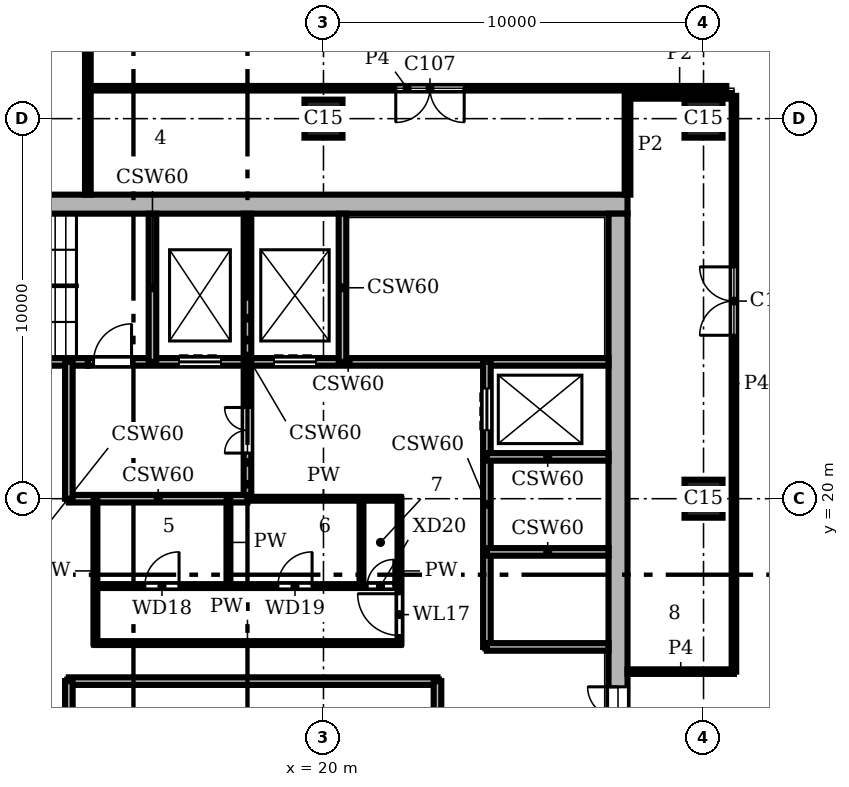
"""IFC4 building model, lengths in metres.
Left out: names, types, materials, properties, quantities, classifications, styles, units other than length and angle.
Written with IfcOpenShell. Run it as: python <this file> out.ifc"""

import sys

from ifc_helpers import new_model, si_unit, direction, frame, frame_2d, origin, origin_2d, place, context, subcontext, project, spatial, rectangle, extrude, element, fill, save


model = new_model("IFC4")
c1 = context("Model", 3, precision=1e-05, world=origin(), true_north=direction((0.0, 1.0)))
c2 = subcontext(c1, "Body", "Model", "MODEL_VIEW")
j1 = project(units=[si_unit("LENGTHUNIT", "METRE"), si_unit("PLANEANGLEUNIT", "RADIAN")], contexts=[c1])
p1 = place(None, origin())
s1 = spatial("IfcSite", under=j1, at=p1, CompositionType="ELEMENT")
p2 = place(p1, origin())
s2 = spatial("IfcBuilding", under=s1, at=p2, CompositionType="ELEMENT")
p3 = place(p2, frame((0.0, 0.0, 251.4)))
s3 = spatial("IfcBuildingStorey", under=s2, at=p3, CompositionType="ELEMENT", Elevation=251.4)
for number, where, z_axis, x_axis in (
    (1, (20.0, 30.0, 0.0), (0.0, 0.0, 1.0), (1.0, 0.0, 0.0)),
    (2, (30.0, 20.0, 0.0), (0.0, 0.0, 1.0), (1.0, 0.0, 0.0)),
    (3, (30.0, 30.0, 0.0), (0.0, 0.0, 1.0), (1.0, 0.0, 0.0)),
):
    element("IfcColumn", number, at=place(p3, frame(where, z_axis=z_axis, x_axis=x_axis)), inside=s3, PredefinedType="COLUMN", context=c2, shape_type="SweptSolid", body=[
        extrude(rectangle(XDim=1.0, YDim=1.0, at=origin_2d()), origin(), (0.0, 0.0, 1.0), 3.9),
    ])
p4 = place(p3, frame((27.75, 8.5, 0.0), z_axis=(0.0, 0.0, 1.0), x_axis=(0.0, 1.0, 0.0)))
e4 = element("IfcWall", 4, at=p4, inside=s3, PredefinedType="SHEAR", context=c2, shape_type="SweptSolid", body=[
    extrude(rectangle(XDim=19.0, YDim=0.5, at=frame_2d((9.5, 0.0))), origin(), (0.0, 0.0, 1.0), 3.9),
])
p5 = place(p4, frame((4.95, 0.0, 0.0)))
e5 = element("IfcOpeningElement", 5, at=p5, cuts=e4, PredefinedType="OPENING", context=c2, shape_type="SweptSolid", body=[
    extrude(rectangle(XDim=1.6, YDim=2.1, at=frame_2d((0.8, 1.05))), frame((0.0, 0.26, 0.0), z_axis=(0.0, -1.0, 0.0), x_axis=(1.0, 0.0, 0.0)), (0.0, 0.0, 1.0), 0.52),
])
p6 = place(p3, frame((28.0, 27.75, 0.0), z_axis=(0.0, 0.0, 1.0), x_axis=(-1.0, 0.0, 0.0)))
e6 = element("IfcWall", 6, at=p6, inside=s3, PredefinedType="SHEAR", context=c2, shape_type="SweptSolid", body=[
    extrude(rectangle(XDim=20.0, YDim=0.5, at=frame_2d((10.0, 0.0))), origin(), (0.0, 0.0, 1.0), 3.9),
])
p7 = place(p3, frame((13.3, 15.2, 0.0), z_axis=(0.0, 0.0, 1.0), x_axis=(1.0, 0.0, 0.0)))
e7 = element("IfcWall", 7, at=p7, inside=s3, PredefinedType="SHEAR", context=c2, shape_type="SweptSolid", body=[
    extrude(rectangle(XDim=9.7, YDim=0.2, at=frame_2d((4.85, 0.0))), origin(), (0.0, 0.0, 1.0), 3.58),
])
p8 = place(p3, frame((24.3, 16.1, 0.0), z_axis=(0.0, 0.0, 1.0), x_axis=(1.0, 0.0, 0.0)))
e8 = element("IfcWall", 8, at=p8, inside=s3, PredefinedType="SHEAR", context=c2, shape_type="SweptSolid", body=[
    extrude(rectangle(XDim=3.2, YDim=0.2, at=frame_2d((1.6, 0.0))), origin(), (0.0, 0.0, 1.0), 3.58),
])
p9 = place(p3, frame((14.0, 16.2, 0.0), z_axis=(0.0, 0.0, 1.0), x_axis=(1.0, 0.0, 0.0)))
e9 = element("IfcWall", 9, at=p9, inside=s3, PredefinedType="PARTITIONING", context=c2, shape_type="SweptSolid", body=[
    extrude(rectangle(XDim=8.0, YDim=0.1, at=frame_2d((4.0, 0.0))), origin(), (0.0, 0.0, 1.0), 3.58),
])
p10 = place(p3, frame((14.0, 17.7, 0.0), z_axis=(0.0, 0.0, 1.0), x_axis=(1.0, 0.0, 0.0)))
e10 = element("IfcWall", 10, at=p10, inside=s3, PredefinedType="PARTITIONING", context=c2, shape_type="SweptSolid", body=[
    extrude(rectangle(XDim=8.0, YDim=0.1, at=frame_2d((4.0, 0.0))), origin(), (0.0, 0.0, 1.0), 3.58),
])
p11 = place(p10, frame((1.3, 0.0, 0.0)))
e11 = element("IfcOpeningElement", 11, at=p11, cuts=e10, PredefinedType="OPENING", context=c2, shape_type="SweptSolid", body=[
    extrude(rectangle(XDim=0.9, YDim=2.1, at=frame_2d((0.45, 1.05))), frame((0.0, 0.06, 0.0), z_axis=(0.0, -1.0, 0.0), x_axis=(1.0, 0.0, 0.0)), (0.0, 0.0, 1.0), 0.12),
])
p12 = place(p10, frame((4.8, 0.0, 0.0)))
e12 = element("IfcOpeningElement", 12, at=p12, cuts=e10, PredefinedType="OPENING", context=c2, shape_type="SweptSolid", body=[
    extrude(rectangle(XDim=0.9, YDim=2.1, at=frame_2d((0.45, 1.05))), frame((0.0, 0.06, 0.0), z_axis=(0.0, -1.0, 0.0), x_axis=(1.0, 0.0, 0.0)), (0.0, 0.0, 1.0), 0.12),
])
p13 = place(p10, frame((7.15, 0.0, 0.0)))
e13 = element("IfcOpeningElement", 13, at=p13, cuts=e10, PredefinedType="OPENING", context=c2, shape_type="SweptSolid", body=[
    extrude(rectangle(XDim=0.7, YDim=2.1, at=frame_2d((0.35, 1.05))), frame((0.0, 0.06, 0.0), z_axis=(0.0, -1.0, 0.0), x_axis=(1.0, 0.0, 0.0)), (0.0, 0.0, 1.0), 0.12),
])
p14 = place(p3, frame((24.3, 18.6, 0.0), z_axis=(0.0, 0.0, 1.0), x_axis=(1.0, 0.0, 0.0)))
e14 = element("IfcWall", 14, at=p14, inside=s3, PredefinedType="SHEAR", context=c2, shape_type="SweptSolid", body=[
    extrude(rectangle(XDim=3.2, YDim=0.2, at=frame_2d((1.6, 0.0))), origin(), (0.0, 0.0, 1.0), 3.58),
])
p15 = place(p3, frame((18.0, 20.0, 0.0), z_axis=(0.0, 0.0, 1.0), x_axis=(1.0, 0.0, 0.0)))
e15 = element("IfcWall", 15, at=p15, inside=s3, PredefinedType="PARTITIONING", context=c2, shape_type="SweptSolid", body=[
    extrude(rectangle(XDim=4.0, YDim=0.1, at=frame_2d((2.0, 0.0))), origin(), (0.0, 0.0, 1.0), 3.58),
])
p16 = place(p3, frame((13.3, 20.0, 0.0), z_axis=(0.0, 0.0, 1.0), x_axis=(1.0, 0.0, 0.0)))
e16 = element("IfcWall", 16, at=p16, inside=s3, PredefinedType="SHEAR", context=c2, shape_type="SweptSolid", body=[
    extrude(rectangle(XDim=4.7, YDim=0.2, at=frame_2d((2.35, 0.0))), origin(), (0.0, 0.0, 1.0), 3.58),
])
p17 = place(p3, frame((24.3, 21.1, 0.0), z_axis=(0.0, 0.0, 1.0), x_axis=(1.0, 0.0, 0.0)))
e17 = element("IfcWall", 17, at=p17, inside=s3, PredefinedType="SHEAR", context=c2, shape_type="SweptSolid", body=[
    extrude(rectangle(XDim=3.2, YDim=0.2, at=frame_2d((1.6, 0.0))), origin(), (0.0, 0.0, 1.0), 3.58),
])
p18 = place(p3, frame((8.5, 23.6, 0.0), z_axis=(0.0, 0.0, 1.0), x_axis=(1.0, 0.0, 0.0)))
e18 = element("IfcWall", 18, at=p18, inside=s3, PredefinedType="SHEAR", context=c2, shape_type="SweptSolid", body=[
    extrude(rectangle(XDim=5.3, YDim=0.2, at=frame_2d((2.65, 0.0))), origin(), (0.0, 0.0, 1.0), 3.58),
])
p19 = place(p3, frame((13.8, 23.6, 0.0), z_axis=(0.0, 0.0, 1.0), x_axis=(1.0, 0.0, 0.0)))
e19 = element("IfcWall", 19, at=p19, inside=s3, PredefinedType="SHEAR", context=c2, shape_type="SweptSolid", body=[
    extrude(rectangle(XDim=13.7, YDim=0.2, at=frame_2d((6.85, 0.0))), origin(), (0.0, 0.0, 1.0), 3.58),
])
p20 = place(p19, frame((2.4, 0.0, 0.0)))
e20 = element("IfcOpeningElement", 20, at=p20, cuts=e19, PredefinedType="OPENING", context=c2, shape_type="SweptSolid", body=[
    extrude(rectangle(XDim=1.1, YDim=2.1, at=frame_2d((0.55, 1.05))), frame((0.0, 0.11, 0.0), z_axis=(0.0, -1.0, 0.0), x_axis=(1.0, 0.0, 0.0)), (0.0, 0.0, 1.0), 0.22),
])
p21 = place(p19, frame((4.9, 0.0, 0.0)))
e21 = element("IfcOpeningElement", 21, at=p21, cuts=e19, PredefinedType="OPENING", context=c2, shape_type="SweptSolid", body=[
    extrude(rectangle(XDim=1.1, YDim=2.1, at=frame_2d((0.55, 1.05))), frame((0.0, 0.11, 0.0), z_axis=(0.0, -1.0, 0.0), x_axis=(1.0, 0.0, 0.0)), (0.0, 0.0, 1.0), 0.22),
])
p22 = place(p19, frame((0.15, 0.0, 0.0)))
e22 = element("IfcOpeningElement", 22, at=p22, cuts=e19, PredefinedType="OPENING", context=c2, shape_type="SweptSolid", body=[
    extrude(rectangle(XDim=1.0, YDim=2.1, at=frame_2d((0.5, 1.05))), frame((0.0, 0.11, 0.0), z_axis=(0.0, -1.0, 0.0), x_axis=(1.0, 0.0, 0.0)), (0.0, 0.0, 1.0), 0.22),
])
p23 = place(p3, frame((13.3, 12.4, 0.0), z_axis=(0.0, 0.0, 1.0), x_axis=(0.0, 1.0, 0.0)))
e23 = element("IfcWall", 23, at=p23, inside=s3, PredefinedType="SHEAR", context=c2, shape_type="SweptSolid", body=[
    extrude(rectangle(XDim=2.8, YDim=0.2, at=frame_2d((1.4, 0.0))), origin(), (0.0, 0.0, 1.0), 3.58),
])
p24 = place(p3, frame((13.3, 20.0, 0.0), z_axis=(0.0, 0.0, 1.0), x_axis=(0.0, 1.0, 0.0)))
e24 = element("IfcWall", 24, at=p24, inside=s3, PredefinedType="SHEAR", context=c2, shape_type="SweptSolid", body=[
    extrude(rectangle(XDim=3.6, YDim=0.2, at=frame_2d((1.8, 0.0))), origin(), (0.0, 0.0, 1.0), 3.58),
])
p25 = place(p3, frame((14.0, 16.2, 0.0), z_axis=(0.0, 0.0, 1.0), x_axis=(0.0, 1.0, 0.0)))
e25 = element("IfcWall", 25, at=p25, inside=s3, PredefinedType="PARTITIONING", context=c2, shape_type="SweptSolid", body=[
    extrude(rectangle(XDim=3.8, YDim=0.1, at=frame_2d((1.9, 0.0))), origin(), (0.0, 0.0, 1.0), 3.58),
])
p26 = place(p3, frame((15.5, 23.6, 0.0), z_axis=(0.0, 0.0, 1.0), x_axis=(0.0, 1.0, 0.0)))
e26 = element("IfcWall", 26, at=p26, inside=s3, PredefinedType="SHEAR", context=c2, shape_type="SweptSolid", body=[
    extrude(rectangle(XDim=3.9, YDim=0.2, at=frame_2d((1.95, 0.0))), origin(), (0.0, 0.0, 1.0), 3.58),
])
p27 = place(p3, frame((17.5, 17.7, 0.0), z_axis=(0.0, 0.0, 1.0), x_axis=(0.0, 1.0, 0.0)))
e27 = element("IfcWall", 27, at=p27, inside=s3, PredefinedType="PARTITIONING", context=c2, shape_type="SweptSolid", body=[
    extrude(rectangle(XDim=2.3, YDim=0.1, at=frame_2d((1.15, 0.0))), origin(), (0.0, 0.0, 1.0), 3.58),
])
p28 = place(p3, frame((18.0, 20.0, 0.0), z_axis=(0.0, 0.0, 1.0), x_axis=(0.0, 1.0, 0.0)))
e28 = element("IfcWall", 28, at=p28, inside=s3, PredefinedType="SHEAR", context=c2, shape_type="SweptSolid", body=[
    extrude(rectangle(XDim=7.5, YDim=0.2, at=frame_2d((3.75, 0.0))), origin(), (0.0, 0.0, 1.0), 3.58),
])
p29 = place(p28, frame((1.2, 0.0, 0.0)))
e29 = element("IfcOpeningElement", 29, at=p29, cuts=e28, PredefinedType="OPENING", context=c2, shape_type="SweptSolid", body=[
    extrude(rectangle(XDim=1.2, YDim=2.1, at=frame_2d((0.6, 1.05))), frame((0.0, 0.11, 0.0), z_axis=(0.0, -1.0, 0.0), x_axis=(1.0, 0.0, 0.0)), (0.0, 0.0, 1.0), 0.22),
])
p30 = place(p3, frame((20.5, 23.6, 0.0), z_axis=(0.0, 0.0, 1.0), x_axis=(0.0, 1.0, 0.0)))
e30 = element("IfcWall", 30, at=p30, inside=s3, PredefinedType="SHEAR", context=c2, shape_type="SweptSolid", body=[
    extrude(rectangle(XDim=3.9, YDim=0.2, at=frame_2d((1.95, 0.0))), origin(), (0.0, 0.0, 1.0), 3.58),
])
p31 = place(p3, frame((21.0, 17.7, 0.0), z_axis=(0.0, 0.0, 1.0), x_axis=(0.0, 1.0, 0.0)))
e31 = element("IfcWall", 31, at=p31, inside=s3, PredefinedType="PARTITIONING", context=c2, shape_type="SweptSolid", body=[
    extrude(rectangle(XDim=2.3, YDim=0.1, at=frame_2d((1.15, 0.0))), origin(), (0.0, 0.0, 1.0), 3.58),
])
p32 = place(p3, frame((22.0, 16.2, 0.0), z_axis=(0.0, 0.0, 1.0), x_axis=(0.0, 1.0, 0.0)))
e32 = element("IfcWall", 32, at=p32, inside=s3, PredefinedType="PARTITIONING", context=c2, shape_type="SweptSolid", body=[
    extrude(rectangle(XDim=3.8, YDim=0.1, at=frame_2d((1.9, 0.0))), origin(), (0.0, 0.0, 1.0), 3.58),
])
p33 = place(p32, frame((0.2, 0.0, 0.0)))
e33 = element("IfcOpeningElement", 33, at=p33, cuts=e32, PredefinedType="OPENING", context=c2, shape_type="SweptSolid", body=[
    extrude(rectangle(XDim=1.1, YDim=2.1, at=frame_2d((0.55, 1.05))), frame((0.0, 0.06, 0.0), z_axis=(0.0, -1.0, 0.0), x_axis=(1.0, 0.0, 0.0)), (0.0, 0.0, 1.0), 0.12),
])
p34 = place(p3, frame((23.0, 12.4, 0.0), z_axis=(0.0, 0.0, 1.0), x_axis=(0.0, 1.0, 0.0)))
e34 = element("IfcWall", 34, at=p34, inside=s3, PredefinedType="SHEAR", context=c2, shape_type="SweptSolid", body=[
    extrude(rectangle(XDim=2.8, YDim=0.2, at=frame_2d((1.4, 0.0))), origin(), (0.0, 0.0, 1.0), 3.58),
])
p35 = place(p34, frame((0.8, 0.0, 0.0)))
e35 = element("IfcOpeningElement", 35, at=p35, cuts=e34, PredefinedType="OPENING", context=c2, shape_type="SweptSolid", body=[
    extrude(rectangle(XDim=1.2, YDim=2.1, at=frame_2d((0.6, 1.05))), frame((0.0, 0.11, 0.0), z_axis=(0.0, -1.0, 0.0), x_axis=(1.0, 0.0, 0.0)), (0.0, 0.0, 1.0), 0.22),
])
p36 = place(p3, frame((24.3, 16.1, 0.0), z_axis=(0.0, 0.0, 1.0), x_axis=(0.0, 1.0, 0.0)))
e36 = element("IfcWall", 36, at=p36, inside=s3, PredefinedType="SHEAR", context=c2, shape_type="SweptSolid", body=[
    extrude(rectangle(XDim=7.5, YDim=0.2, at=frame_2d((3.75, 0.0))), origin(), (0.0, 0.0, 1.0), 3.58),
])
p37 = place(p36, frame((5.7, 0.0, 0.0)))
e37 = element("IfcOpeningElement", 37, at=p37, cuts=e36, PredefinedType="OPENING", context=c2, shape_type="SweptSolid", body=[
    extrude(rectangle(XDim=1.1, YDim=2.1, at=frame_2d((0.55, 1.05))), frame((0.0, 0.11, 0.0), z_axis=(0.0, -1.0, 0.0), x_axis=(1.0, 0.0, 0.0)), (0.0, 0.0, 1.0), 0.22),
])
p38 = place(p3, frame((13.8, 28.0, 0.0), z_axis=(0.0, 0.0, 1.0), x_axis=(0.0, 1.0, 0.0)))
e38 = element("IfcWall", 38, at=p38, inside=s3, PredefinedType="PARTITIONING", context=c2, shape_type="SweptSolid", body=[
    extrude(rectangle(XDim=29.6, YDim=0.15, at=frame_2d((14.8, 0.0))), origin(), (0.0, 0.0, 1.0), 3.58),
])
p39 = place(p38, frame((17.601, 0.0, 0.0)))
e39 = element("IfcOpeningElement", 39, at=p39, cuts=e38, PredefinedType="OPENING", context=c2, shape_type="SweptSolid", body=[
    extrude(rectangle(XDim=1.0, YDim=2.1, at=frame_2d((0.5, 1.05))), frame((0.0, 0.085, 0.0), z_axis=(0.0, -1.0, 0.0), x_axis=(1.0, 0.0, 0.0)), (0.0, 0.0, 1.0), 0.17),
])
p40 = place(p3, frame((28.0, 28.0, 0.0), z_axis=(0.0, 0.0, 1.0), x_axis=(0.0, 1.0, 0.0)))
e40 = element("IfcWall", 40, at=p40, inside=s3, PredefinedType="PARTITIONING", context=c2, shape_type="SweptSolid", body=[
    extrude(rectangle(XDim=2.598, YDim=0.15, at=frame_2d((1.299, 0.0))), origin(), (0.0, 0.0, 1.0), 3.58),
])
p41 = place(p3, frame((28.002, 30.6, 0.0), z_axis=(0.0, 0.0, 1.0), x_axis=(1.0, 0.0, 0.0)))
e41 = element("IfcWall", 41, at=p41, inside=s3, PredefinedType="PARTITIONING", context=c2, shape_type="SweptSolid", body=[
    extrude(rectangle(XDim=2.738, YDim=0.15, at=frame_2d((1.369, 0.0))), origin(), (0.0, 0.0, 1.0), 3.58),
])
p42 = place(p3, frame((30.8, 15.45, 0.0), z_axis=(0.0, 0.0, 1.0), x_axis=(0.0, 1.0, 0.0)))
e42 = element("IfcWall", 42, at=p42, inside=s3, PredefinedType="PARTITIONING", context=c2, shape_type="SweptSolid", body=[
    extrude(rectangle(XDim=15.15, YDim=0.12, at=frame_2d((7.575, 0.0))), origin(), (0.0, 0.0, 1.0), 3.58),
])
p43 = place(p42, frame((8.85, 0.0, 0.0)))
e43 = element("IfcOpeningElement", 43, at=p43, cuts=e42, PredefinedType="OPENING", context=c2, shape_type="SweptSolid", body=[
    extrude(rectangle(XDim=1.8, YDim=2.1, at=frame_2d((0.9, 1.05))), frame((0.0, 0.07, 0.0), z_axis=(0.0, -1.0, 0.0), x_axis=(1.0, 0.0, 0.0)), (0.0, 0.0, 1.0), 0.14),
])
p44 = place(p3, frame((28.0, 15.45, 0.0), z_axis=(0.0, 0.0, 1.0), x_axis=(1.0, 0.0, 0.0)))
e44 = element("IfcWall", 44, at=p44, inside=s3, PredefinedType="PARTITIONING", context=c2, shape_type="SweptSolid", body=[
    extrude(rectangle(XDim=2.8, YDim=0.12, at=frame_2d((1.4, 0.0))), origin(), (0.0, 0.0, 1.0), 3.58),
])
p45 = place(p3, frame((13.802, 30.8, 0.0), z_axis=(0.0, 0.0, 1.0), x_axis=(1.0, 0.0, 0.0)))
e45 = element("IfcWall", 45, at=p45, inside=s3, PredefinedType="PARTITIONING", context=c2, shape_type="SweptSolid", body=[
    extrude(rectangle(XDim=16.798, YDim=0.12, at=frame_2d((8.399, 0.0))), origin(), (0.0, 0.0, 1.0), 3.58),
])
p46 = place(p45, frame((8.1, 0.0, 0.0)))
e46 = element("IfcOpeningElement", 46, at=p46, cuts=e45, PredefinedType="OPENING", context=c2, shape_type="SweptSolid", body=[
    extrude(rectangle(XDim=1.8, YDim=2.1, at=frame_2d((0.9, 1.05))), frame((0.0, 0.07, 0.0), z_axis=(0.0, -1.0, 0.0), x_axis=(1.0, 0.0, 0.0)), (0.0, 0.0, 1.0), 0.14),
])
p47 = place(p37, origin())
e47 = element("IfcDoor", 47, at=p47, inside=s3, OperationType="DOUBLE_DOOR_SLIDING", PredefinedType="DOOR", context=c2, shape_type="SweptSolid", body=[
    extrude(rectangle(XDim=1.1, YDim=2.1, at=frame_2d((0.55, 1.05))), frame((0.0, 0.025, 0.0), z_axis=(0.0, -1.0, 0.0), x_axis=(1.0, 0.0, 0.0)), (0.0, 0.0, 1.0), 0.05),
])
fill(e37, e47)
p48 = place(p20, origin())
e48 = element("IfcDoor", 48, at=p48, inside=s3, OperationType="DOUBLE_DOOR_SLIDING", PredefinedType="DOOR", context=c2, shape_type="SweptSolid", body=[
    extrude(rectangle(XDim=1.1, YDim=2.1, at=frame_2d((0.55, 1.05))), frame((0.0, 0.025, 0.0), z_axis=(0.0, -1.0, 0.0), x_axis=(1.0, 0.0, 0.0)), (0.0, 0.0, 1.0), 0.05),
])
fill(e20, e48)
p49 = place(p21, origin())
e49 = element("IfcDoor", 49, at=p49, inside=s3, OperationType="DOUBLE_DOOR_SLIDING", PredefinedType="DOOR", context=c2, shape_type="SweptSolid", body=[
    extrude(rectangle(XDim=1.1, YDim=2.1, at=frame_2d((0.55, 1.05))), frame((0.0, 0.025, 0.0), z_axis=(0.0, -1.0, 0.0), x_axis=(1.0, 0.0, 0.0)), (0.0, 0.0, 1.0), 0.05),
])
fill(e21, e49)
p50 = place(p22, origin())
e50 = element("IfcDoor", 50, at=p50, inside=s3, OperationType="SINGLE_SWING_RIGHT", PredefinedType="DOOR", context=c2, shape_type="SweptSolid", body=[
    extrude(rectangle(XDim=1.0, YDim=2.1, at=frame_2d((0.5, 1.05))), frame((0.0, 0.025, 0.0), z_axis=(0.0, -1.0, 0.0), x_axis=(1.0, 0.0, 0.0)), (0.0, 0.0, 1.0), 0.05),
])
fill(e22, e50)
p51 = place(p29, origin())
e51 = element("IfcDoor", 51, at=p51, inside=s3, OperationType="DOUBLE_DOOR_SINGLE_SWING", PredefinedType="DOOR", context=c2, shape_type="SweptSolid", body=[
    extrude(rectangle(XDim=1.2, YDim=2.1, at=frame_2d((0.6, 1.05))), frame((0.0, 0.025, 0.0), z_axis=(0.0, -1.0, 0.0), x_axis=(1.0, 0.0, 0.0)), (0.0, 0.0, 1.0), 0.05),
])
fill(e29, e51)
p52 = place(p33, origin())
e52 = element("IfcDoor", 52, at=p52, inside=s3, OperationType="SINGLE_SWING_RIGHT", PredefinedType="DOOR", context=c2, shape_type="SweptSolid", body=[
    extrude(rectangle(XDim=1.1, YDim=2.1, at=frame_2d((0.55, 1.05))), frame((0.0, 0.025, 0.0), z_axis=(0.0, -1.0, 0.0), x_axis=(1.0, 0.0, 0.0)), (0.0, 0.0, 1.0), 0.05),
])
fill(e33, e52)
p53 = place(p11, origin())
e53 = element("IfcDoor", 53, at=p53, inside=s3, OperationType="SINGLE_SWING_RIGHT", PredefinedType="DOOR", context=c2, shape_type="SweptSolid", body=[
    extrude(rectangle(XDim=0.9, YDim=2.1, at=frame_2d((0.45, 1.05))), frame((0.0, 0.025, 0.0), z_axis=(0.0, -1.0, 0.0), x_axis=(1.0, 0.0, 0.0)), (0.0, 0.0, 1.0), 0.05),
])
fill(e11, e53)
p54 = place(p12, origin())
e54 = element("IfcDoor", 54, at=p54, inside=s3, OperationType="SINGLE_SWING_RIGHT", PredefinedType="DOOR", context=c2, shape_type="SweptSolid", body=[
    extrude(rectangle(XDim=0.9, YDim=2.1, at=frame_2d((0.45, 1.05))), frame((0.0, 0.025, 0.0), z_axis=(0.0, -1.0, 0.0), x_axis=(1.0, 0.0, 0.0)), (0.0, 0.0, 1.0), 0.05),
])
fill(e12, e54)
p55 = place(p13, origin())
e55 = element("IfcDoor", 55, at=p55, inside=s3, OperationType="SINGLE_SWING_RIGHT", PredefinedType="DOOR", context=c2, shape_type="SweptSolid", body=[
    extrude(rectangle(XDim=0.7, YDim=2.1, at=frame_2d((0.35, 1.05))), frame((0.0, 0.025, 0.0), z_axis=(0.0, -1.0, 0.0), x_axis=(1.0, 0.0, 0.0)), (0.0, 0.0, 1.0), 0.05),
])
fill(e13, e55)
p56 = place(p5, origin())
e56 = element("IfcDoor", 56, at=p56, inside=s3, OperationType="DOUBLE_DOOR_SINGLE_SWING", PredefinedType="DOOR", context=c2, shape_type="SweptSolid", body=[
    extrude(rectangle(XDim=1.6, YDim=2.1, at=frame_2d((0.8, 1.05))), frame((0.0, 0.025, 0.0), z_axis=(0.0, -1.0, 0.0), x_axis=(1.0, 0.0, 0.0)), (0.0, 0.0, 1.0), 0.05),
])
fill(e5, e56)
p57 = place(p46, frame((1.8, 0.0, 0.0), z_axis=(0.0, 0.0, 1.0), x_axis=(-1.0, 0.0, 0.0)))
e57 = element("IfcDoor", 57, at=p57, inside=s3, OperationType="DOUBLE_DOOR_SINGLE_SWING", PredefinedType="DOOR", context=c2, shape_type="SweptSolid", body=[
    extrude(rectangle(XDim=1.8, YDim=2.1, at=frame_2d((0.9, 1.05))), frame((0.0, 0.025, 0.0), z_axis=(0.0, -1.0, 0.0), x_axis=(1.0, 0.0, 0.0)), (0.0, 0.0, 1.0), 0.05),
])
fill(e46, e57)
p58 = place(p43, origin())
e58 = element("IfcDoor", 58, at=p58, inside=s3, OperationType="DOUBLE_DOOR_SINGLE_SWING", PredefinedType="DOOR", context=c2, shape_type="SweptSolid", body=[
    extrude(rectangle(XDim=1.8, YDim=2.1, at=frame_2d((0.9, 1.05))), frame((0.0, 0.025, 0.0), z_axis=(0.0, -1.0, 0.0), x_axis=(1.0, 0.0, 0.0)), (0.0, 0.0, 1.0), 0.05),
])
fill(e43, e58)
save(model, sys.argv[1])
